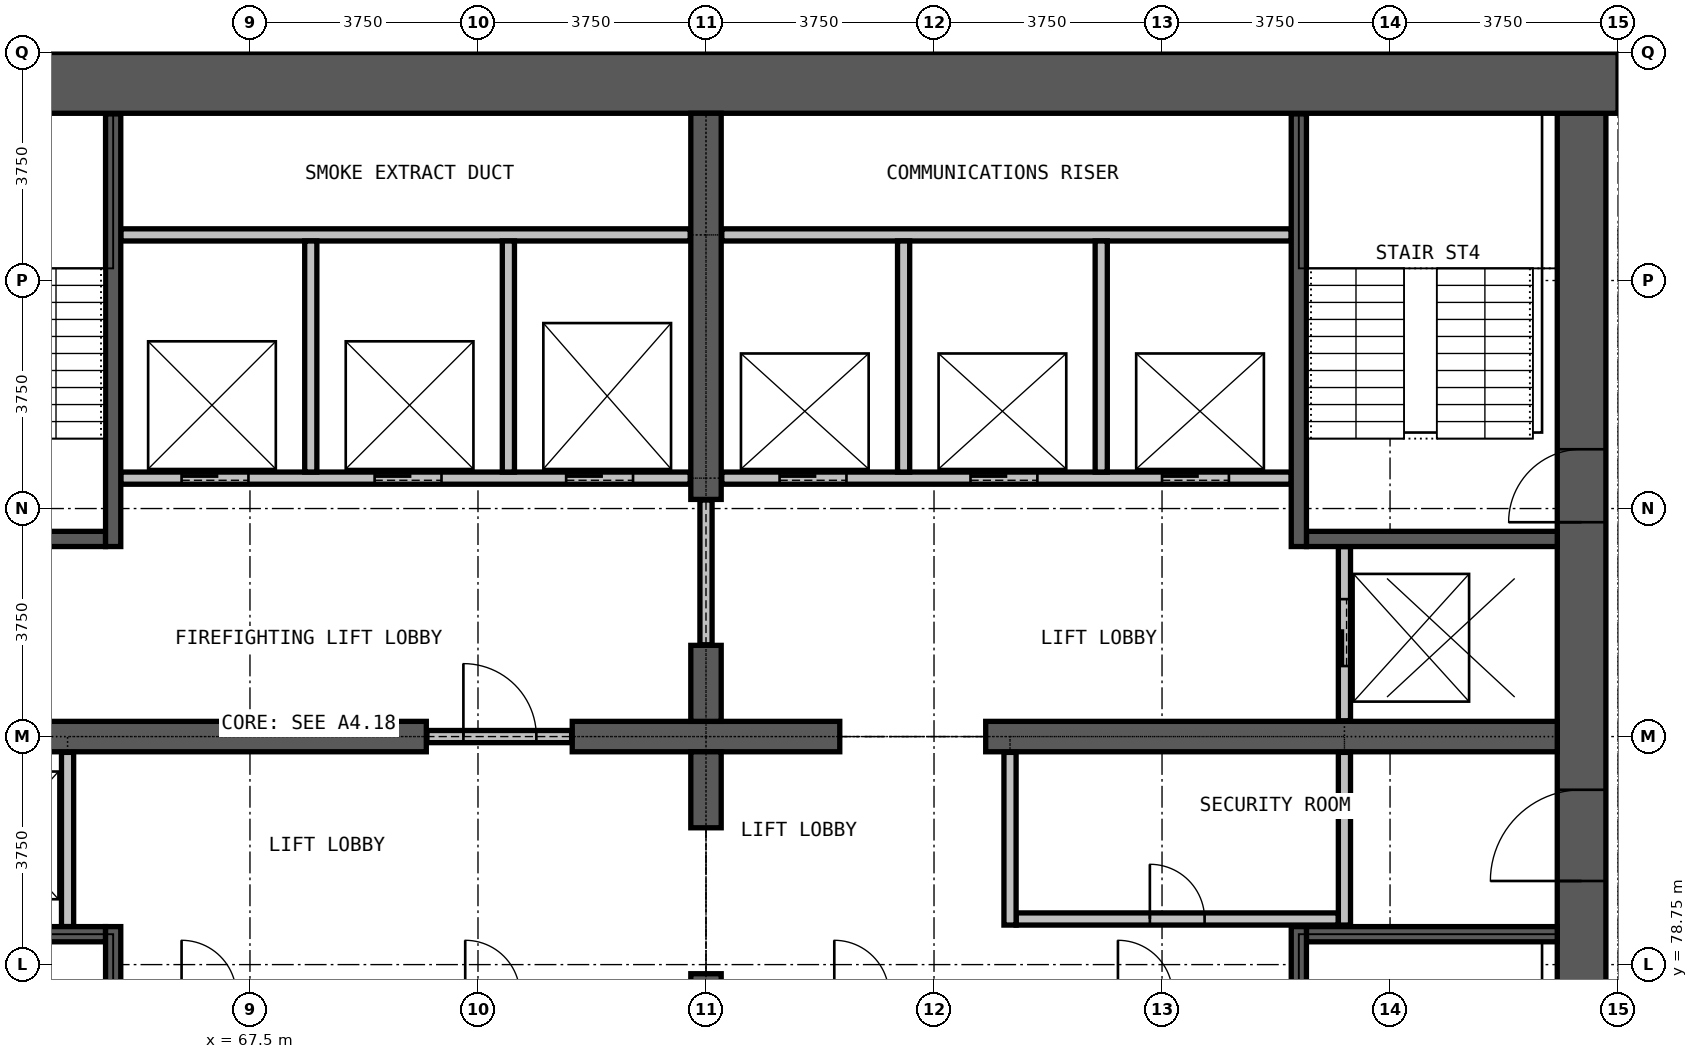
"""IFC4 building model, lengths in metres.
Left out: names, types, materials, properties, quantities, classifications, styles, units other than length and angle.
Written with IfcOpenShell. Run it as: python <this file> out.ifc"""

import sys

from ifc_helpers import new_model, si_unit, direction, frame, frame_2d, origin, place, context, subcontext, project, spatial, rectangle, extrude, element, fill, save


model = new_model("IFC4")
c1 = context("Model", 3, precision=1e-05, world=origin(), true_north=direction((0.0, 1.0)))
c2 = subcontext(c1, "Body", "Model", "MODEL_VIEW")
j1 = project(units=[si_unit("LENGTHUNIT", "METRE"), si_unit("PLANEANGLEUNIT", "RADIAN")], contexts=[c1])
p1 = place(None, origin())
s1 = spatial("IfcSite", under=j1, at=p1, CompositionType="ELEMENT")
p2 = place(p1, origin())
s2 = spatial("IfcBuilding", under=s1, at=p2, CompositionType="ELEMENT")
p3 = place(p2, frame((0.0, 0.0, 169.3)))
s3 = spatial("IfcBuildingStorey", under=s2, at=p3, CompositionType="ELEMENT", Elevation=169.3)
p4 = place(p3, frame((89.4, 72.25, 0.0), z_axis=(0.0, 0.0, 1.0), x_axis=(0.0, 1.0, 0.0)))
e1 = element("IfcWall", 1, at=p4, inside=s3, PredefinedType="SHEAR", context=c2, shape_type="SweptSolid", body=[
    extrude(rectangle(XDim=20.5, YDim=0.8, at=frame_2d((10.25, 0.0))), origin(), (0.0, 0.0, 1.0), 3.6),
])
p5 = place(p4, frame((0.275, 0.0, 0.0)))
e2 = element("IfcOpeningElement", 2, at=p5, cuts=e1, PredefinedType="OPENING", context=c2, shape_type="SweptSolid", body=[
    extrude(rectangle(XDim=1.2, YDim=2.2, at=frame_2d((0.6, 1.1))), frame((0.0, 0.41, 0.0), z_axis=(0.0, -1.0, 0.0), x_axis=(1.0, 0.0, 0.0)), (0.0, 0.0, 1.0), 0.82),
])
p6 = place(p4, frame((13.775, 0.0, 0.0)))
e3 = element("IfcOpeningElement", 3, at=p6, cuts=e1, PredefinedType="OPENING", context=c2, shape_type="SweptSolid", body=[
    extrude(rectangle(XDim=1.2, YDim=2.2, at=frame_2d((0.6, 1.1))), frame((0.0, 0.41, 0.0), z_axis=(0.0, -1.0, 0.0), x_axis=(1.0, 0.0, 0.0)), (0.0, 0.0, 1.0), 0.82),
])
p7 = place(p4, frame((7.875, 0.0, 0.0)))
e4 = element("IfcOpeningElement", 4, at=p7, cuts=e1, PredefinedType="OPENING", context=c2, shape_type="SweptSolid", body=[
    extrude(rectangle(XDim=1.5, YDim=2.2, at=frame_2d((0.75, 1.1))), frame((0.0, 0.41, 0.0), z_axis=(0.0, -1.0, 0.0), x_axis=(1.0, 0.0, 0.0)), (0.0, 0.0, 1.0), 0.82),
])
p8 = place(p3, frame((90.0, 93.25, 0.0), z_axis=(0.0, 0.0, 1.0), x_axis=(-1.0, 0.0, 0.0)))
e5 = element("IfcWall", 5, at=p8, inside=s3, PredefinedType="SHEAR", context=c2, shape_type="SweptSolid", body=[
    extrude(rectangle(XDim=30.0, YDim=1.0, at=frame_2d((15.0, 0.0))), origin(), (0.0, 0.0, 1.0), 3.6),
])
p9 = place(p3, frame((61.0, 82.5, 0.0), z_axis=(0.0, 0.0, 1.0), x_axis=(1.0, 0.0, 0.0)))
e6 = element("IfcWall", 6, at=p9, inside=s3, PredefinedType="SHEAR", context=c2, shape_type="SweptSolid", body=[
    extrude(rectangle(XDim=9.4, YDim=0.5, at=frame_2d((4.7, 0.0))), origin(), (0.0, 0.0, 1.0), 3.6),
])
p10 = place(p3, frame((72.8, 82.5, 0.0), z_axis=(0.0, 0.0, 1.0), x_axis=(1.0, 0.0, 0.0)))
e7 = element("IfcWall", 7, at=p10, inside=s3, PredefinedType="SHEAR", context=c2, shape_type="SweptSolid", body=[
    extrude(rectangle(XDim=4.4, YDim=0.5, at=frame_2d((2.2, 0.0))), origin(), (0.0, 0.0, 1.0), 3.6),
])
p11 = place(p3, frame((79.6, 82.5, 0.0), z_axis=(0.0, 0.0, 1.0), x_axis=(1.0, 0.0, 0.0)))
e8 = element("IfcWall", 8, at=p11, inside=s3, PredefinedType="SHEAR", context=c2, shape_type="SweptSolid", body=[
    extrude(rectangle(XDim=9.4, YDim=0.5, at=frame_2d((4.7, 0.0))), origin(), (0.0, 0.0, 1.0), 3.6),
])
p12 = place(p3, frame((75.0, 72.25, 0.0), z_axis=(0.0, 0.0, 1.0), x_axis=(0.0, 1.0, 0.0)))
e9 = element("IfcWall", 9, at=p12, inside=s3, PredefinedType="SHEAR", context=c2, shape_type="SweptSolid", body=[
    extrude(rectangle(XDim=6.35, YDim=0.5, at=frame_2d((3.175, 0.0))), origin(), (0.0, 0.0, 1.0), 3.6),
])
for number, where, z_axis, x_axis in (
    (10, (75.0, 81.0, 0.0), (0.0, 0.0, 1.0), (0.0, 1.0, 0.0)),
    (11, (75.0, 82.75, 0.0), (0.0, 0.0, 1.0), (0.0, 1.0, 0.0)),
):
    element("IfcWall", number, at=place(p3, frame(where, z_axis=z_axis, x_axis=x_axis)), inside=s3, PredefinedType="SHEAR", context=c2, shape_type="SweptSolid", body=[
        extrude(rectangle(XDim=1.25, YDim=0.5, at=frame_2d((0.625, 0.0))), origin(), (0.0, 0.0, 1.0), 3.6),
    ])
p13 = place(p3, frame((75.0, 86.4, 0.0), z_axis=(0.0, 0.0, 1.0), x_axis=(0.0, 1.0, 0.0)))
e12 = element("IfcWall", 12, at=p13, inside=s3, PredefinedType="SHEAR", context=c2, shape_type="SweptSolid", body=[
    extrude(rectangle(XDim=6.35, YDim=0.5, at=frame_2d((3.175, 0.0))), origin(), (0.0, 0.0, 1.0), 3.6),
])
p14 = place(p3, frame((80.1, 79.5, 0.0), z_axis=(0.0, 0.0, 1.0), x_axis=(1.0, 0.0, 0.0)))
e13 = element("IfcWall", 13, at=p14, inside=s3, PredefinedType="PARTITIONING", context=c2, shape_type="SweptSolid", body=[
    extrude(rectangle(XDim=5.3, YDim=0.2, at=frame_2d((2.65, 0.0))), origin(), (0.0, 0.0, 1.0), 3.3),
])
p15 = place(p14, frame((2.2, 0.0, 0.0)))
e14 = element("IfcOpeningElement", 14, at=p15, cuts=e13, PredefinedType="OPENING", context=c2, shape_type="SweptSolid", body=[
    extrude(rectangle(XDim=0.9, YDim=2.2, at=frame_2d((0.45, 1.1))), frame((0.0, 0.11, 0.0), z_axis=(0.0, -1.0, 0.0), x_axis=(1.0, 0.0, 0.0)), (0.0, 0.0, 1.0), 0.22),
])
p16 = place(p3, frame((70.41, 82.5, 0.0), z_axis=(0.0, 0.0, 1.0), x_axis=(1.0, 0.0, 0.0)))
e15 = element("IfcWall", 15, at=p16, inside=s3, PredefinedType="PARTITIONING", context=c2, shape_type="SweptSolid", body=[
    extrude(rectangle(XDim=2.38, YDim=0.2, at=frame_2d((1.19, 0.0))), origin(), (0.0, 0.0, 1.0), 2.4),
])
p17 = place(p16, frame((0.6, 0.0, 0.0)))
e16 = element("IfcOpeningElement", 16, at=p17, cuts=e15, PredefinedType="OPENING", context=c2, shape_type="SweptSolid", body=[
    extrude(rectangle(XDim=1.2, YDim=2.2, at=frame_2d((0.6, 1.1))), frame((0.0, 0.11, 0.0), z_axis=(0.0, -1.0, 0.0), x_axis=(1.0, 0.0, 0.0)), (0.0, 0.0, 1.0), 0.22),
])
p18 = place(p3, frame((75.0, 84.01, 0.0), z_axis=(0.0, 0.0, 1.0), x_axis=(0.0, 1.0, 0.0)))
e17 = element("IfcWall", 17, at=p18, inside=s3, PredefinedType="PARTITIONING", context=c2, shape_type="SweptSolid", body=[
    extrude(rectangle(XDim=2.38, YDim=0.2, at=frame_2d((1.19, 0.0))), origin(), (0.0, 0.0, 1.0), 2.4),
])
for number, where, z_axis, x_axis in (
    (18, (80.0, 79.4, 0.0), (0.0, 0.0, 1.0), (0.0, 1.0, 0.0)),
    (19, (85.5, 79.4, 0.0), (0.0, 0.0, 1.0), (0.0, 1.0, 0.0)),
):
    element("IfcWall", number, at=place(p3, frame(where, z_axis=z_axis, x_axis=x_axis)), inside=s3, PredefinedType="PARTITIONING", context=c2, shape_type="SweptSolid", body=[
        extrude(rectangle(XDim=2.84, YDim=0.2, at=frame_2d((1.42, 0.0))), origin(), (0.0, 0.0, 1.0), 3.3),
    ])
p19 = place(p3, frame((65.375, 86.75, 0.0), z_axis=(0.0, 0.0, 1.0), x_axis=(1.0, 0.0, 0.0)))
e20 = element("IfcWall", 20, at=p19, inside=s3, PredefinedType="PARTITIONING", context=c2, shape_type="SweptSolid", body=[
    extrude(rectangle(XDim=9.365, YDim=0.2, at=frame_2d((4.683, 0.0))), origin(), (0.0, 0.0, 1.0), 3.3),
])
p20 = place(p19, frame((1.0, 0.0, 0.0)))
e21 = element("IfcOpeningElement", 21, at=p20, cuts=e20, PredefinedType="OPENING", context=c2, shape_type="SweptSolid", body=[
    extrude(rectangle(XDim=1.1, YDim=2.2, at=frame_2d((0.55, 1.1))), frame((0.0, 0.11, 0.0), z_axis=(0.0, -1.0, 0.0), x_axis=(1.0, 0.0, 0.0)), (0.0, 0.0, 1.0), 0.22),
])
p21 = place(p19, frame((4.175, 0.0, 0.0)))
e22 = element("IfcOpeningElement", 22, at=p21, cuts=e20, PredefinedType="OPENING", context=c2, shape_type="SweptSolid", body=[
    extrude(rectangle(XDim=1.1, YDim=2.2, at=frame_2d((0.55, 1.1))), frame((0.0, 0.11, 0.0), z_axis=(0.0, -1.0, 0.0), x_axis=(1.0, 0.0, 0.0)), (0.0, 0.0, 1.0), 0.22),
])
p22 = place(p19, frame((7.325, 0.0, 0.0)))
e23 = element("IfcOpeningElement", 23, at=p22, cuts=e20, PredefinedType="OPENING", context=c2, shape_type="SweptSolid", body=[
    extrude(rectangle(XDim=1.1, YDim=2.2, at=frame_2d((0.55, 1.1))), frame((0.0, 0.11, 0.0), z_axis=(0.0, -1.0, 0.0), x_axis=(1.0, 0.0, 0.0)), (0.0, 0.0, 1.0), 0.22),
])
p23 = place(p3, frame((75.26, 86.75, 0.0), z_axis=(0.0, 0.0, 1.0), x_axis=(1.0, 0.0, 0.0)))
e24 = element("IfcWall", 24, at=p23, inside=s3, PredefinedType="PARTITIONING", context=c2, shape_type="SweptSolid", body=[
    extrude(rectangle(XDim=9.365, YDim=0.2, at=frame_2d((4.683, 0.0))), origin(), (0.0, 0.0, 1.0), 3.3),
])
p24 = place(p23, frame((0.95, 0.0, 0.0)))
e25 = element("IfcOpeningElement", 25, at=p24, cuts=e24, PredefinedType="OPENING", context=c2, shape_type="SweptSolid", body=[
    extrude(rectangle(XDim=1.1, YDim=2.2, at=frame_2d((0.55, 1.1))), frame((0.0, 0.11, 0.0), z_axis=(0.0, -1.0, 0.0), x_axis=(1.0, 0.0, 0.0)), (0.0, 0.0, 1.0), 0.22),
])
p25 = place(p23, frame((4.09, 0.0, 0.0)))
e26 = element("IfcOpeningElement", 26, at=p25, cuts=e24, PredefinedType="OPENING", context=c2, shape_type="SweptSolid", body=[
    extrude(rectangle(XDim=1.1, YDim=2.2, at=frame_2d((0.55, 1.1))), frame((0.0, 0.11, 0.0), z_axis=(0.0, -1.0, 0.0), x_axis=(1.0, 0.0, 0.0)), (0.0, 0.0, 1.0), 0.22),
])
p26 = place(p23, frame((7.24, 0.0, 0.0)))
e27 = element("IfcOpeningElement", 27, at=p26, cuts=e24, PredefinedType="OPENING", context=c2, shape_type="SweptSolid", body=[
    extrude(rectangle(XDim=1.1, YDim=2.2, at=frame_2d((0.55, 1.1))), frame((0.0, 0.11, 0.0), z_axis=(0.0, -1.0, 0.0), x_axis=(1.0, 0.0, 0.0)), (0.0, 0.0, 1.0), 0.22),
])
for number, where, z_axis, x_axis in (
    (28, (65.375, 90.75, 0.0), (0.0, 0.0, 1.0), (1.0, 0.0, 0.0)),
    (29, (75.26, 90.75, 0.0), (0.0, 0.0, 1.0), (1.0, 0.0, 0.0)),
):
    element("IfcWall", number, at=place(p3, frame(where, z_axis=z_axis, x_axis=x_axis)), inside=s3, PredefinedType="PARTITIONING", context=c2, shape_type="SweptSolid", body=[
        extrude(rectangle(XDim=9.365, YDim=0.2, at=frame_2d((4.683, 0.0))), origin(), (0.0, 0.0, 1.0), 3.3),
    ])
p27 = place(p3, frame((64.5, 79.375, 0.0), z_axis=(0.0, 0.0, 1.0), x_axis=(0.0, 1.0, 0.0)))
e30 = element("IfcWall", 30, at=p27, inside=s3, PredefinedType="PARTITIONING", context=c2, shape_type="SweptSolid", body=[
    extrude(rectangle(XDim=2.865, YDim=0.2, at=frame_2d((1.433, 0.0))), origin(), (0.0, 0.0, 1.0), 3.3),
])
for number, where, z_axis, x_axis in (
    (31, (68.5, 86.85, 0.0), (0.0, 0.0, 1.0), (0.0, 1.0, 0.0)),
    (32, (71.75, 86.85, 0.0), (0.0, 0.0, 1.0), (0.0, 1.0, 0.0)),
    (33, (78.25, 86.85, 0.0), (0.0, 0.0, 1.0), (0.0, 1.0, 0.0)),
    (34, (81.5, 86.85, 0.0), (0.0, 0.0, 1.0), (0.0, 1.0, 0.0)),
):
    element("IfcWall", number, at=place(p3, frame(where, z_axis=z_axis, x_axis=x_axis)), inside=s3, PredefinedType="PARTITIONING", context=c2, shape_type="SweptSolid", body=[
        extrude(rectangle(XDim=3.8, YDim=0.2, at=frame_2d((1.9, 0.0))), origin(), (0.0, 0.0, 1.0), 3.3),
    ])
p28 = place(p3, frame((85.5, 82.76, 0.0), z_axis=(0.0, 0.0, 1.0), x_axis=(0.0, 1.0, 0.0)))
e35 = element("IfcWall", 35, at=p28, inside=s3, PredefinedType="PARTITIONING", context=c2, shape_type="SweptSolid", body=[
    extrude(rectangle(XDim=2.865, YDim=0.2, at=frame_2d((1.433, 0.0))), origin(), (0.0, 0.0, 1.0), 3.3),
])
p29 = place(p28, frame((0.9, 0.0, 0.0)))
e36 = element("IfcOpeningElement", 36, at=p29, cuts=e35, PredefinedType="OPENING", context=c2, shape_type="SweptSolid", body=[
    extrude(rectangle(XDim=1.1, YDim=2.2, at=frame_2d((0.55, 1.1))), frame((0.0, 0.11, 0.0), z_axis=(0.0, -1.0, 0.0), x_axis=(1.0, 0.0, 0.0)), (0.0, 0.0, 1.0), 0.22),
])
p30 = place(p3, frame((61.01, 79.25, 0.0), z_axis=(0.0, 0.0, 1.0), x_axis=(1.0, 0.0, 0.0)))
e37 = element("IfcWall", 37, at=p30, inside=s3, PredefinedType="PARTITIONING", context=c2, shape_type="SweptSolid", body=[
    extrude(rectangle(XDim=4.115, YDim=0.25, at=frame_2d((2.058, 0.0))), origin(), (0.0, 0.0, 1.0), 3.3),
])
p31 = place(p3, frame((84.875, 79.25, 0.0), z_axis=(0.0, 0.0, 1.0), x_axis=(1.0, 0.0, 0.0)))
e38 = element("IfcWall", 38, at=p31, inside=s3, PredefinedType="PARTITIONING", context=c2, shape_type="SweptSolid", body=[
    extrude(rectangle(XDim=4.125, YDim=0.25, at=frame_2d((2.062, 0.0))), origin(), (0.0, 0.0, 1.0), 3.3),
])
p32 = place(p3, frame((61.01, 85.75, 0.0), z_axis=(0.0, 0.0, 1.0), x_axis=(1.0, 0.0, 0.0)))
e39 = element("IfcWall", 39, at=p32, inside=s3, PredefinedType="PARTITIONING", context=c2, shape_type="SweptSolid", body=[
    extrude(rectangle(XDim=4.115, YDim=0.25, at=frame_2d((2.058, 0.0))), origin(), (0.0, 0.0, 1.0), 3.3),
])
p33 = place(p32, frame((1.45, 0.0, 0.0)))
e40 = element("IfcOpeningElement", 40, at=p33, cuts=e39, PredefinedType="OPENING", context=c2, shape_type="SweptSolid", body=[
    extrude(rectangle(XDim=1.2, YDim=2.2, at=frame_2d((0.6, 1.1))), frame((0.0, 0.135, 0.0), z_axis=(0.0, -1.0, 0.0), x_axis=(1.0, 0.0, 0.0)), (0.0, 0.0, 1.0), 0.27),
])
p34 = place(p3, frame((84.875, 85.75, 0.0), z_axis=(0.0, 0.0, 1.0), x_axis=(1.0, 0.0, 0.0)))
e41 = element("IfcWall", 41, at=p34, inside=s3, PredefinedType="PARTITIONING", context=c2, shape_type="SweptSolid", body=[
    extrude(rectangle(XDim=4.125, YDim=0.25, at=frame_2d((2.062, 0.0))), origin(), (0.0, 0.0, 1.0), 3.3),
])
p35 = place(p3, frame((65.25, 72.25, 0.0), z_axis=(0.0, 0.0, 1.0), x_axis=(0.0, 1.0, 0.0)))
e42 = element("IfcWall", 42, at=p35, inside=s3, PredefinedType="PARTITIONING", context=c2, shape_type="SweptSolid", body=[
    extrude(rectangle(XDim=7.125, YDim=0.25, at=frame_2d((3.562, 0.0))), origin(), (0.0, 0.0, 1.0), 3.3),
])
p36 = place(p3, frame((65.25, 85.625, 0.0), z_axis=(0.0, 0.0, 1.0), x_axis=(0.0, 1.0, 0.0)))
e43 = element("IfcWall", 43, at=p36, inside=s3, PredefinedType="PARTITIONING", context=c2, shape_type="SweptSolid", body=[
    extrude(rectangle(XDim=7.115, YDim=0.25, at=frame_2d((3.558, 0.0))), origin(), (0.0, 0.0, 1.0), 3.3),
])
p37 = place(p3, frame((84.75, 72.25, 0.0), z_axis=(0.0, 0.0, 1.0), x_axis=(0.0, 1.0, 0.0)))
e44 = element("IfcWall", 44, at=p37, inside=s3, PredefinedType="PARTITIONING", context=c2, shape_type="SweptSolid", body=[
    extrude(rectangle(XDim=7.125, YDim=0.25, at=frame_2d((3.562, 0.0))), origin(), (0.0, 0.0, 1.0), 3.3),
])
p38 = place(p3, frame((84.75, 85.625, 0.0), z_axis=(0.0, 0.0, 1.0), x_axis=(0.0, 1.0, 0.0)))
e45 = element("IfcWall", 45, at=p38, inside=s3, PredefinedType="PARTITIONING", context=c2, shape_type="SweptSolid", body=[
    extrude(rectangle(XDim=7.115, YDim=0.25, at=frame_2d((3.558, 0.0))), origin(), (0.0, 0.0, 1.0), 3.3),
])
p39 = place(p24, origin())
e46 = element("IfcDoor", 46, at=p39, inside=s3, OperationType="DOUBLE_DOOR_SLIDING", PredefinedType="DOOR", context=c2, shape_type="SweptSolid", body=[
    extrude(rectangle(XDim=1.1, YDim=2.2, at=frame_2d((0.55, 1.1))), frame((0.0, 0.025, 0.0), z_axis=(0.0, -1.0, 0.0), x_axis=(1.0, 0.0, 0.0)), (0.0, 0.0, 1.0), 0.05),
])
fill(e25, e46)
p40 = place(p25, origin())
e47 = element("IfcDoor", 47, at=p40, inside=s3, OperationType="DOUBLE_DOOR_SLIDING", PredefinedType="DOOR", context=c2, shape_type="SweptSolid", body=[
    extrude(rectangle(XDim=1.1, YDim=2.2, at=frame_2d((0.55, 1.1))), frame((0.0, 0.025, 0.0), z_axis=(0.0, -1.0, 0.0), x_axis=(1.0, 0.0, 0.0)), (0.0, 0.0, 1.0), 0.05),
])
fill(e26, e47)
p41 = place(p26, origin())
e48 = element("IfcDoor", 48, at=p41, inside=s3, OperationType="DOUBLE_DOOR_SLIDING", PredefinedType="DOOR", context=c2, shape_type="SweptSolid", body=[
    extrude(rectangle(XDim=1.1, YDim=2.2, at=frame_2d((0.55, 1.1))), frame((0.0, 0.025, 0.0), z_axis=(0.0, -1.0, 0.0), x_axis=(1.0, 0.0, 0.0)), (0.0, 0.0, 1.0), 0.05),
])
fill(e27, e48)
p42 = place(p20, origin())
e49 = element("IfcDoor", 49, at=p42, inside=s3, OperationType="DOUBLE_DOOR_SLIDING", PredefinedType="DOOR", context=c2, shape_type="SweptSolid", body=[
    extrude(rectangle(XDim=1.1, YDim=2.2, at=frame_2d((0.55, 1.1))), frame((0.0, 0.025, 0.0), z_axis=(0.0, -1.0, 0.0), x_axis=(1.0, 0.0, 0.0)), (0.0, 0.0, 1.0), 0.05),
])
fill(e21, e49)
p43 = place(p21, origin())
e50 = element("IfcDoor", 50, at=p43, inside=s3, OperationType="DOUBLE_DOOR_SLIDING", PredefinedType="DOOR", context=c2, shape_type="SweptSolid", body=[
    extrude(rectangle(XDim=1.1, YDim=2.2, at=frame_2d((0.55, 1.1))), frame((0.0, 0.025, 0.0), z_axis=(0.0, -1.0, 0.0), x_axis=(1.0, 0.0, 0.0)), (0.0, 0.0, 1.0), 0.05),
])
fill(e22, e50)
p44 = place(p22, origin())
e51 = element("IfcDoor", 51, at=p44, inside=s3, OperationType="DOUBLE_DOOR_SLIDING", PredefinedType="DOOR", context=c2, shape_type="SweptSolid", body=[
    extrude(rectangle(XDim=1.1, YDim=2.2, at=frame_2d((0.55, 1.1))), frame((0.0, 0.025, 0.0), z_axis=(0.0, -1.0, 0.0), x_axis=(1.0, 0.0, 0.0)), (0.0, 0.0, 1.0), 0.05),
])
fill(e23, e51)
p45 = place(p29, origin())
e52 = element("IfcDoor", 52, at=p45, inside=s3, OperationType="DOUBLE_DOOR_SLIDING", PredefinedType="DOOR", context=c2, shape_type="SweptSolid", body=[
    extrude(rectangle(XDim=1.1, YDim=2.2, at=frame_2d((0.55, 1.1))), frame((0.0, 0.025, 0.0), z_axis=(0.0, -1.0, 0.0), x_axis=(1.0, 0.0, 0.0)), (0.0, 0.0, 1.0), 0.05),
])
fill(e36, e52)
p46 = place(p17, origin())
e53 = element("IfcDoor", 53, at=p46, inside=s3, OperationType="SINGLE_SWING_LEFT", PredefinedType="DOOR", context=c2, shape_type="SweptSolid", body=[
    extrude(rectangle(XDim=1.2, YDim=2.2, at=frame_2d((0.6, 1.1))), frame((0.0, 0.025, 0.0), z_axis=(0.0, -1.0, 0.0), x_axis=(1.0, 0.0, 0.0)), (0.0, 0.0, 1.0), 0.05),
])
fill(e16, e53)
p47 = place(p6, origin())
e54 = element("IfcDoor", 54, at=p47, inside=s3, OperationType="SINGLE_SWING_LEFT", PredefinedType="DOOR", context=c2, shape_type="SweptSolid", body=[
    extrude(rectangle(XDim=1.2, YDim=2.2, at=frame_2d((0.6, 1.1))), frame((0.0, 0.025, 0.0), z_axis=(0.0, -1.0, 0.0), x_axis=(1.0, 0.0, 0.0)), (0.0, 0.0, 1.0), 0.05),
])
fill(e3, e54)
p48 = place(p7, origin())
e55 = element("IfcDoor", 55, at=p48, inside=s3, OperationType="DOUBLE_DOOR_SINGLE_SWING", PredefinedType="DOOR", context=c2, shape_type="SweptSolid", body=[
    extrude(rectangle(XDim=1.5, YDim=2.2, at=frame_2d((0.75, 1.1))), frame((0.0, 0.025, 0.0), z_axis=(0.0, -1.0, 0.0), x_axis=(1.0, 0.0, 0.0)), (0.0, 0.0, 1.0), 0.05),
])
fill(e4, e55)
p49 = place(p15, origin())
e56 = element("IfcDoor", 56, at=p49, inside=s3, OperationType="SINGLE_SWING_RIGHT", PredefinedType="DOOR", context=c2, shape_type="SweptSolid", body=[
    extrude(rectangle(XDim=0.9, YDim=2.2, at=frame_2d((0.45, 1.1))), frame((0.0, 0.025, 0.0), z_axis=(0.0, -1.0, 0.0), x_axis=(1.0, 0.0, 0.0)), (0.0, 0.0, 1.0), 0.05),
])
fill(e14, e56)
save(model, sys.argv[1])
